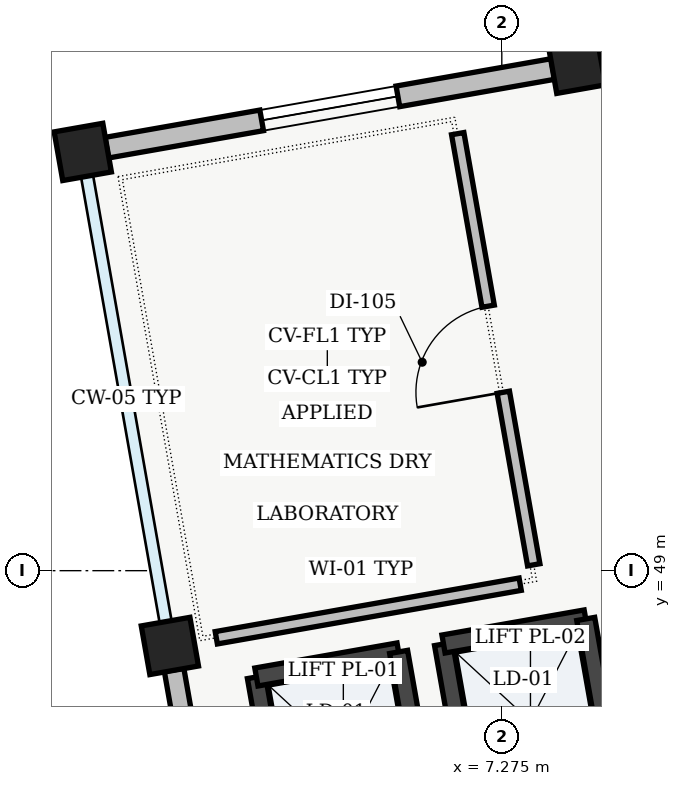
"""IFC4 building model, lengths in metres.
Left out: names, types, materials, properties, quantities, classifications, styles, units other than length and angle.
Written with IfcOpenShell. Run it as: python <this file> out.ifc"""

import sys

from ifc_helpers import new_model, si_unit, direction, frame, frame_2d, origin, origin_2d, place, context, subcontext, project, spatial, rectangle, extrude, element, fill, save


model = new_model("IFC4")
c1 = context("Model", 3, precision=1e-05, world=origin(), true_north=direction((0.0, 1.0)))
c2 = subcontext(c1, "Body", "Model", "MODEL_VIEW")
j1 = project(units=[si_unit("LENGTHUNIT", "METRE"), si_unit("PLANEANGLEUNIT", "RADIAN")], contexts=[c1])
p1 = place(None, origin())
s1 = spatial("IfcSite", under=j1, at=p1, CompositionType="ELEMENT")
p2 = place(p1, origin())
s2 = spatial("IfcBuilding", under=s1, at=p2, CompositionType="ELEMENT")
p3 = place(p2, frame((0.0, 0.0, 18.6)))
s3 = spatial("IfcBuildingStorey", under=s2, at=p3, CompositionType="ELEMENT", Elevation=18.6)
for number, where, z_axis, x_axis in (
    (1, (2.908, 48.01, 0.0), (0.0, 0.0, 1.0), (0.985, 0.174, 0.0)),
    (2, (1.762, 54.509, 0.0), (0.0, 0.0, 1.0), (0.985, 0.174, 0.0)),
    (3, (8.261, 55.655, 0.0), (0.0, 0.0, 1.0), (0.985, 0.174, 0.0)),
):
    element("IfcColumn", number, at=place(p3, frame(where, z_axis=z_axis, x_axis=x_axis)), inside=s3, PredefinedType="COLUMN", context=c2, shape_type="SweptSolid", body=[
        extrude(rectangle(XDim=0.65, YDim=0.65, at=origin_2d()), origin(), (0.0, 0.0, 1.0), 4.32),
    ])
p4 = place(p3, frame((3.998, 41.825, 0.0), z_axis=(0.0, 0.0, 1.0), x_axis=(-0.173645120828, 0.98480829201, 0.0)))
e4 = element("IfcWall", 4, at=p4, inside=s3, PredefinedType="STANDARD", context=c2, shape_type="SweptSolid", body=[
    extrude(rectangle(XDim=5.96, YDim=0.26, at=frame_2d((2.98, 0.0))), origin(), (0.0, 0.0, 1.0), 3.855),
])
p5 = place(p4, frame((2.025, 0.0, 0.95)))
e5 = element("IfcOpeningElement", 5, at=p5, cuts=e4, PredefinedType="OPENING", context=c2, shape_type="SweptSolid", body=[
    extrude(rectangle(XDim=1.91, YDim=1.4, at=frame_2d((0.955, 0.7))), frame((0.0, 0.13, 0.0), z_axis=(0.0, -1.0, 0.0), x_axis=(1.0, 0.0, 0.0)), (0.0, 0.0, 1.0), 0.26),
])
p6 = place(p3, frame((2.077, 54.565, 0.0), z_axis=(0.0, 0.0, 1.0), x_axis=(0.98480829201, 0.173645120828, 0.0)))
e6 = element("IfcWall", 6, at=p6, inside=s3, PredefinedType="STANDARD", context=c2, shape_type="SweptSolid", body=[
    extrude(rectangle(XDim=5.96, YDim=0.275, at=frame_2d((2.98, 0.0))), origin(), (0.0, 0.0, 1.0), 3.855),
])
p7 = place(p6, frame((2.07, 0.0, 0.95)))
e7 = element("IfcOpeningElement", 7, at=p7, cuts=e6, PredefinedType="OPENING", context=c2, shape_type="SweptSolid", body=[
    extrude(rectangle(XDim=1.82, YDim=1.38, at=frame_2d((0.91, 0.69))), frame((0.0, 0.137, 0.0), z_axis=(0.0, -1.0, 0.0), x_axis=(1.0, 0.0, 0.0)), (0.0, 0.0, 1.0), 0.275),
])
p8 = place(p3, frame((4.463, 45.237, 0.0), z_axis=(0.0, 0.0, 1.0), x_axis=(-0.173646056486, 0.984808127031, 0.0)))
e8 = element("IfcWall", 8, at=p8, inside=s3, PredefinedType="SHEAR", context=c2, shape_type="SweptSolid", body=[
    extrude(rectangle(XDim=2.4, YDim=0.24, at=frame_2d((1.2, 0.0))), origin(), (0.0, 0.0, 1.0), 4.28),
])
p9 = place(p3, frame((4.046, 47.601, 0.0), z_axis=(0.0, 0.0, 1.0), x_axis=(0.984793905749, 0.173726691098, 0.0)))
e9 = element("IfcWall", 9, at=p9, inside=s3, PredefinedType="SHEAR", context=c2, shape_type="SweptSolid", body=[
    extrude(rectangle(XDim=1.9, YDim=0.24, at=frame_2d((0.95, 0.0))), origin(), (0.0, 0.0, 1.0), 4.28),
])
for number, where, z_axis, x_axis in (
    (10, (5.917, 47.931, 0.0), (0.0, 0.0, 1.0), (0.174, -0.985, 0.0)),
    (11, (6.925, 45.671, 0.0), (0.0, 0.0, 1.0), (-0.174, 0.985, 0.0)),
):
    element("IfcWall", number, at=place(p3, frame(where, z_axis=z_axis, x_axis=x_axis)), inside=s3, PredefinedType="SHEAR", context=c2, shape_type="SweptSolid", body=[
        extrude(rectangle(XDim=2.4, YDim=0.24, at=frame_2d((1.2, 0.0))), origin(), (0.0, 0.0, 1.0), 4.28),
    ])
p10 = place(p3, frame((6.508, 48.035, 0.0), z_axis=(0.0, 0.0, 1.0), x_axis=(0.984793905749, 0.173726691098, 0.0)))
e12 = element("IfcWall", 12, at=p10, inside=s3, PredefinedType="SHEAR", context=c2, shape_type="SweptSolid", body=[
    extrude(rectangle(XDim=1.9, YDim=0.24, at=frame_2d((0.95, 0.0))), origin(), (0.0, 0.0, 1.0), 4.28),
])
p11 = place(p3, frame((8.379, 48.365, 0.0), z_axis=(0.0, 0.0, 1.0), x_axis=(0.173646056486, -0.984808127031, 0.0)))
e13 = element("IfcWall", 13, at=p11, inside=s3, PredefinedType="SHEAR", context=c2, shape_type="SweptSolid", body=[
    extrude(rectangle(XDim=2.4, YDim=0.24, at=frame_2d((1.2, 0.0))), origin(), (0.0, 0.0, 1.0), 4.28),
])
p12 = place(p3, frame((3.518, 48.117, 0.0), z_axis=(0.0, 0.0, 1.0), x_axis=(0.984816834462, 0.173596666326, 0.0)))
e14 = element("IfcWall", 14, at=p12, inside=s3, PredefinedType="PARTITIONING", context=c2, shape_type="SweptSolid", body=[
    extrude(rectangle(XDim=4.06, YDim=0.165, at=frame_2d((2.03, 0.0))), origin(), (0.0, 0.0, 1.0), 3.655),
])
p13 = place(p3, frame((7.695, 49.077, 0.0), z_axis=(0.0, 0.0, 1.0), x_axis=(-0.173649928941, 0.984807444214, 0.0)))
e15 = element("IfcWall", 15, at=p13, inside=s3, PredefinedType="PARTITIONING", context=c2, shape_type="SweptSolid", body=[
    extrude(rectangle(XDim=5.76, YDim=0.165, at=frame_2d((2.88, 0.0))), origin(), (0.0, 0.0, 1.0), 3.95),
])
p14 = place(p13, frame((2.305, 0.0, 0.0)))
e16 = element("IfcOpeningElement", 16, at=p14, cuts=e15, PredefinedType="OPENING", context=c2, shape_type="SweptSolid", body=[
    extrude(rectangle(XDim=1.15, YDim=2.12, at=frame_2d((0.575, 1.06))), frame((0.0, 0.083, 0.0), z_axis=(0.0, -1.0, 0.0), x_axis=(1.0, 0.0, 0.0)), (0.0, 0.0, 1.0), 0.165),
])
p15 = place(p7, origin())
e17 = element("IfcWindow", 17, at=p15, inside=s3, PartitioningType="SINGLE_PANEL", PredefinedType="WINDOW", context=c2, shape_type="SweptSolid", body=[
    extrude(rectangle(XDim=1.82, YDim=1.38, at=frame_2d((0.91, 0.69))), frame((0.0, 0.03, 0.0), z_axis=(0.0, -1.0, 0.0), x_axis=(1.0, 0.0, 0.0)), (0.0, 0.0, 1.0), 0.06),
])
fill(e7, e17)
p16 = place(p14, origin())
e18 = element("IfcDoor", 18, at=p16, inside=s3, OperationType="SINGLE_SWING_LEFT", PredefinedType="DOOR", context=c2, shape_type="SweptSolid", body=[
    extrude(rectangle(XDim=1.15, YDim=2.12, at=frame_2d((0.575, 1.06))), frame((0.0, 0.025, 0.0), z_axis=(0.0, -1.0, 0.0), x_axis=(1.0, 0.0, 0.0)), (0.0, 0.0, 1.0), 0.05),
])
fill(e16, e18)
save(model, sys.argv[1])
